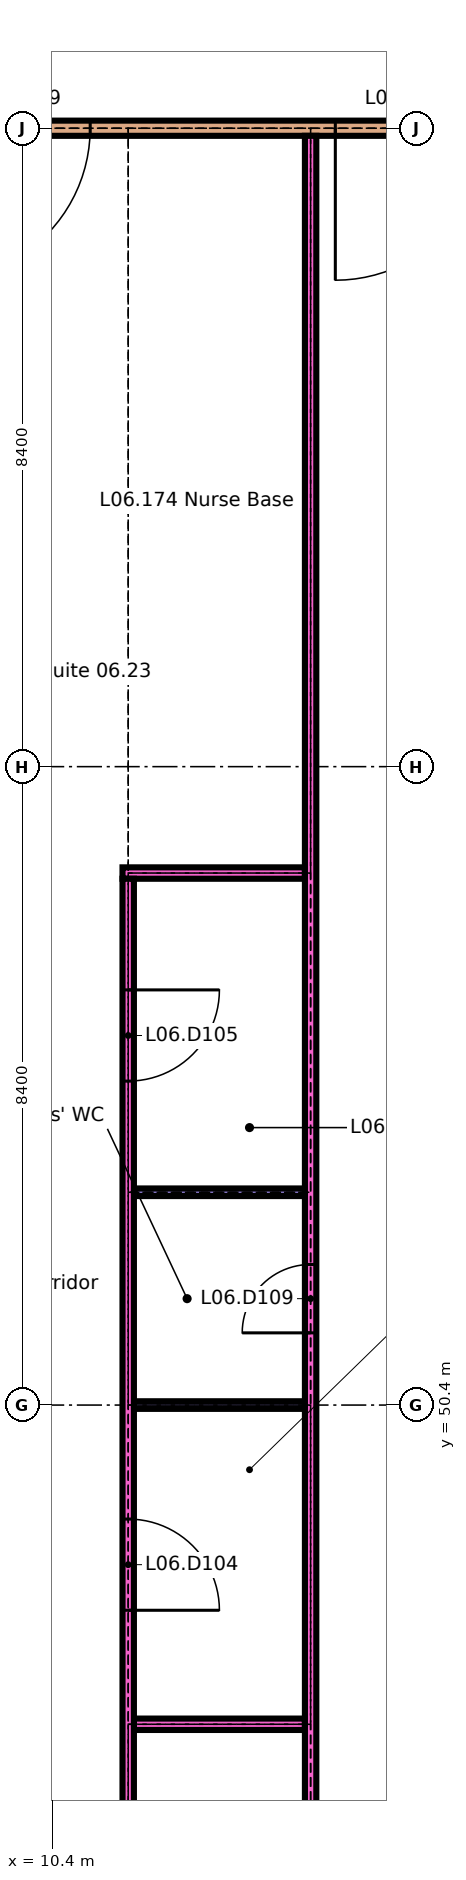
"""IFC4 building model, lengths in metres.
Left out: names, types, materials, properties, quantities, classifications, styles, units other than length and angle.
Written with IfcOpenShell. Run it as: python <this file> out.ifc"""

import sys

from ifc_helpers import new_model, si_unit, direction, frame, frame_2d, origin, place, context, subcontext, project, spatial, rectangle, extrude, element, fill, save


model = new_model("IFC4")
c1 = context("Model", 3, precision=1e-05, world=origin(), true_north=direction((0.0, 1.0)))
c2 = subcontext(c1, "Body", "Model", "MODEL_VIEW")
j1 = project(units=[si_unit("LENGTHUNIT", "METRE"), si_unit("PLANEANGLEUNIT", "RADIAN")], contexts=[c1])
p1 = place(None, origin())
s1 = spatial("IfcSite", under=j1, at=p1, CompositionType="ELEMENT")
p2 = place(p1, origin())
s2 = spatial("IfcBuilding", under=s1, at=p2, CompositionType="ELEMENT")
p3 = place(p2, frame((0.0, 0.0, 26.1)))
s3 = spatial("IfcBuildingStorey", under=s2, at=p3, CompositionType="ELEMENT", Elevation=26.1)
p4 = place(p3, frame((11.475, 46.2, 0.0), z_axis=(0.0, 0.0, 1.0), x_axis=(1.0, 0.0, 0.0)))
e1 = element("IfcWall", 1, at=p4, inside=s3, PredefinedType="PARTITIONING", context=c2, shape_type="SweptSolid", body=[
    extrude(rectangle(XDim=2.25, YDim=0.15, at=frame_2d((1.125, 0.0))), origin(), (0.0, 0.0, 1.0), 3.3),
])
for number, where, z_axis, x_axis in (
    (2, (11.475, 50.4, 0.0), (0.0, 0.0, 1.0), (1.0, 0.0, 0.0)),
    (3, (11.475, 53.2, 0.0), (0.0, 0.0, 1.0), (1.0, 0.0, 0.0)),
):
    element("IfcWall", number, at=place(p3, frame(where, z_axis=z_axis, x_axis=x_axis)), inside=s3, PredefinedType="PARTITIONING", context=c2, shape_type="SweptSolid", body=[
        extrude(rectangle(XDim=2.25, YDim=0.1, at=frame_2d((1.125, 0.0))), origin(), (0.0, 0.0, 1.0), 3.3),
    ])
p5 = place(p3, frame((11.325, 57.4, 0.0), z_axis=(0.0, 0.0, 1.0), x_axis=(1.0, 0.0, 0.0)))
e4 = element("IfcWall", 4, at=p5, inside=s3, PredefinedType="PARTITIONING", context=c2, shape_type="SweptSolid", body=[
    extrude(rectangle(XDim=2.4, YDim=0.15, at=frame_2d((1.2, 0.0))), origin(), (0.0, 0.0, 1.0), 3.3),
])
p6 = place(p3, frame((3.6, 67.2, 0.0), z_axis=(0.0, 0.0, 1.0), x_axis=(1.0, 0.0, 0.0)))
e5 = element("IfcWall", 5, at=p6, inside=s3, PredefinedType="PARTITIONING", context=c2, shape_type="SweptSolid", body=[
    extrude(rectangle(XDim=12.85, YDim=0.2, at=frame_2d((6.425, 0.0))), origin(), (0.0, 0.0, 1.0), 3.3),
])
p7 = place(p6, frame((5.3, 0.0, 0.0)))
e6 = element("IfcOpeningElement", 6, at=p7, cuts=e5, PredefinedType="OPENING", context=c2, shape_type="SweptSolid", body=[
    extrude(rectangle(XDim=2.0, YDim=2.4, at=frame_2d((1.0, 1.2))), frame((0.0, 0.11, 0.0), z_axis=(0.0, -1.0, 0.0), x_axis=(1.0, 0.0, 0.0)), (0.0, 0.0, 1.0), 0.22),
])
p8 = place(p6, frame((10.525, 0.0, 0.0)))
e7 = element("IfcOpeningElement", 7, at=p8, cuts=e5, PredefinedType="OPENING", context=c2, shape_type="SweptSolid", body=[
    extrude(rectangle(XDim=2.0, YDim=2.4, at=frame_2d((1.0, 1.2))), frame((0.0, 0.11, 0.0), z_axis=(0.0, -1.0, 0.0), x_axis=(1.0, 0.0, 0.0)), (0.0, 0.0, 1.0), 0.22),
])
p9 = place(p3, frame((11.4, 42.075, 0.0), z_axis=(0.0, 0.0, 1.0), x_axis=(0.0, 1.0, 0.0)))
e8 = element("IfcWall", 8, at=p9, inside=s3, PredefinedType="PARTITIONING", context=c2, shape_type="SweptSolid", body=[
    extrude(rectangle(XDim=15.25, YDim=0.15, at=frame_2d((7.625, 0.0))), origin(), (0.0, 0.0, 1.0), 3.3),
])
p10 = place(p9, frame((1.512, 0.0, 0.0)))
e9 = element("IfcOpeningElement", 9, at=p10, cuts=e8, PredefinedType="OPENING", context=c2, shape_type="SweptSolid", body=[
    extrude(rectangle(XDim=1.1, YDim=2.1, at=frame_2d((0.55, 1.05))), frame((0.0, 0.085, 0.0), z_axis=(0.0, -1.0, 0.0), x_axis=(1.0, 0.0, 0.0)), (0.0, 0.0, 1.0), 0.17),
])
p11 = place(p9, frame((5.625, 0.0, 0.0)))
e10 = element("IfcOpeningElement", 10, at=p11, cuts=e8, PredefinedType="OPENING", context=c2, shape_type="SweptSolid", body=[
    extrude(rectangle(XDim=1.2, YDim=2.1, at=frame_2d((0.6, 1.05))), frame((0.0, 0.085, 0.0), z_axis=(0.0, -1.0, 0.0), x_axis=(1.0, 0.0, 0.0)), (0.0, 0.0, 1.0), 0.17),
])
p12 = place(p9, frame((12.587, 0.0, 0.0)))
e11 = element("IfcOpeningElement", 11, at=p12, cuts=e8, PredefinedType="OPENING", context=c2, shape_type="SweptSolid", body=[
    extrude(rectangle(XDim=1.2, YDim=2.1, at=frame_2d((0.6, 1.05))), frame((0.0, 0.085, 0.0), z_axis=(0.0, -1.0, 0.0), x_axis=(1.0, 0.0, 0.0)), (0.0, 0.0, 1.0), 0.17),
])
p13 = place(p3, frame((13.8, 33.7, 0.0), z_axis=(0.0, 0.0, 1.0), x_axis=(0.0, 1.0, 0.0)))
e12 = element("IfcWall", 12, at=p13, inside=s3, PredefinedType="PARTITIONING", context=c2, shape_type="SweptSolid", body=[
    extrude(rectangle(XDim=33.4, YDim=0.15, at=frame_2d((16.7, 0.0))), origin(), (0.0, 0.0, 1.0), 3.3),
])
p14 = place(p13, frame((17.65, 0.0, 0.0)))
e13 = element("IfcOpeningElement", 13, at=p14, cuts=e12, PredefinedType="OPENING", context=c2, shape_type="SweptSolid", body=[
    extrude(rectangle(XDim=0.9, YDim=2.1, at=frame_2d((0.45, 1.05))), frame((0.0, 0.085, 0.0), z_axis=(0.0, -1.0, 0.0), x_axis=(1.0, 0.0, 0.0)), (0.0, 0.0, 1.0), 0.17),
])
p15 = place(p7, origin())
e14 = element("IfcDoor", 14, at=p15, inside=s3, OperationType="SINGLE_SWING_LEFT", PredefinedType="DOOR", context=c2, shape_type="SweptSolid", body=[
    extrude(rectangle(XDim=2.0, YDim=2.4, at=frame_2d((1.0, 1.2))), frame((0.0, 0.03, 0.0), z_axis=(0.0, -1.0, 0.0), x_axis=(1.0, 0.0, 0.0)), (0.0, 0.0, 1.0), 0.06),
])
fill(e6, e14)
p16 = place(p8, origin())
e15 = element("IfcDoor", 15, at=p16, inside=s3, OperationType="SINGLE_SWING_LEFT", PredefinedType="DOOR", context=c2, shape_type="SweptSolid", body=[
    extrude(rectangle(XDim=2.0, YDim=2.4, at=frame_2d((1.0, 1.2))), frame((0.0, 0.03, 0.0), z_axis=(0.0, -1.0, 0.0), x_axis=(1.0, 0.0, 0.0)), (0.0, 0.0, 1.0), 0.06),
])
fill(e7, e15)
p17 = place(p11, origin())
e16 = element("IfcDoor", 16, at=p17, inside=s3, OperationType="SINGLE_SWING_LEFT", PredefinedType="DOOR", context=c2, shape_type="SweptSolid", body=[
    extrude(rectangle(XDim=1.2, YDim=2.1, at=frame_2d((0.6, 1.05))), frame((0.0, 0.025, 0.0), z_axis=(0.0, -1.0, 0.0), x_axis=(1.0, 0.0, 0.0)), (0.0, 0.0, 1.0), 0.05),
])
fill(e10, e16)
p18 = place(p12, origin())
e17 = element("IfcDoor", 17, at=p18, inside=s3, OperationType="SINGLE_SWING_RIGHT", PredefinedType="DOOR", context=c2, shape_type="SweptSolid", body=[
    extrude(rectangle(XDim=1.2, YDim=2.1, at=frame_2d((0.6, 1.05))), frame((0.0, 0.025, 0.0), z_axis=(0.0, -1.0, 0.0), x_axis=(1.0, 0.0, 0.0)), (0.0, 0.0, 1.0), 0.05),
])
fill(e11, e17)
p19 = place(p14, origin())
e18 = element("IfcDoor", 18, at=p19, inside=s3, OperationType="SINGLE_SWING_RIGHT", PredefinedType="DOOR", context=c2, shape_type="SweptSolid", body=[
    extrude(rectangle(XDim=0.9, YDim=2.1, at=frame_2d((0.45, 1.05))), frame((0.0, 0.02, 0.0), z_axis=(0.0, -1.0, 0.0), x_axis=(1.0, 0.0, 0.0)), (0.0, 0.0, 1.0), 0.04),
])
fill(e13, e18)
save(model, sys.argv[1])
